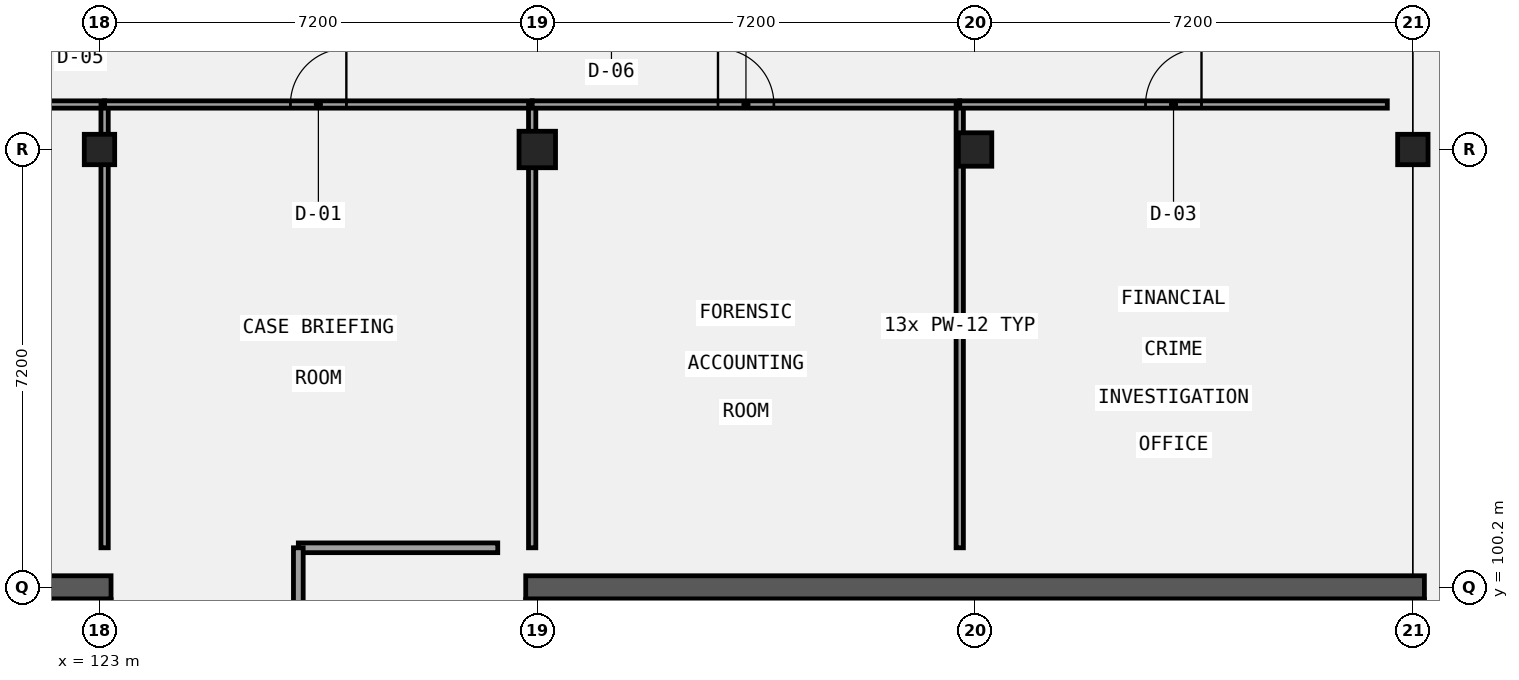
"""IFC4 building model, lengths in metres.
Left out: names, types, materials, properties, quantities, classifications, styles, units other than length and angle.
Written with IfcOpenShell. Run it as: python <this file> out.ifc"""

import sys

from ifc_helpers import new_model, si_unit, direction, frame, frame_2d, origin, origin_2d, place, context, subcontext, project, spatial, rectangle, extrude, element, fill, save


model = new_model("IFC4")
c1 = context("Model", 3, precision=1e-05, world=origin(), true_north=direction((0.0, 1.0)))
c2 = subcontext(c1, "Body", "Model", "MODEL_VIEW")
j1 = project(units=[si_unit("LENGTHUNIT", "METRE"), si_unit("PLANEANGLEUNIT", "RADIAN")], contexts=[c1])
p1 = place(None, origin())
s1 = spatial("IfcSite", under=j1, at=p1, CompositionType="ELEMENT")
p2 = place(p1, origin())
s2 = spatial("IfcBuilding", under=s1, at=p2, CompositionType="ELEMENT")
p3 = place(p2, frame((0.0, 0.0, 18.0)))
s3 = spatial("IfcBuildingStorey", under=s2, at=p3, CompositionType="ELEMENT", Elevation=18.0)
p4 = place(p3, frame((108.41, 100.2, 0.0), z_axis=(0.0, 0.0, 1.0), x_axis=(1.0, 0.0, 0.0)))
e1 = element("IfcWall", 1, at=p4, inside=s3, PredefinedType="SHEAR", context=c2, shape_type="SweptSolid", body=[
    extrude(rectangle(XDim=14.78, YDim=0.38, at=frame_2d((7.39, 0.0))), origin(), (0.0, 0.0, 1.0), 4.2),
])
p5 = place(p3, frame((123.0, 93.2, 0.0), z_axis=(0.0, 0.0, 1.0), x_axis=(0.0, 1.0, 0.0)))
e2 = element("IfcWall", 2, at=p5, inside=s3, PredefinedType="SHEAR", context=c2, shape_type="SweptSolid", body=[
    extrude(rectangle(XDim=6.8, YDim=0.38, at=frame_2d((3.4, 0.0))), origin(), (0.0, 0.0, 1.0), 4.2),
])
p6 = place(p3, frame((122.34, 96.82, 0.0), z_axis=(0.0, 0.0, 1.0), x_axis=(0.0, 1.0, 0.0)))
e3 = element("IfcWall", 3, at=p6, inside=s3, PredefinedType="SHEAR", context=c2, shape_type="SweptSolid", body=[
    extrude(rectangle(XDim=3.18, YDim=0.38, at=frame_2d((1.59, 0.0))), origin(), (0.0, 0.0, 1.0), 4.2),
])
p7 = place(p3, frame((130.01, 100.2, 0.0), z_axis=(0.0, 0.0, 1.0), x_axis=(1.0, 0.0, 0.0)))
e4 = element("IfcWall", 4, at=p7, inside=s3, PredefinedType="SHEAR", context=c2, shape_type="SweptSolid", body=[
    extrude(rectangle(XDim=14.78, YDim=0.38, at=frame_2d((7.39, 0.0))), origin(), (0.0, 0.0, 1.0), 4.2),
])
for number, where, z_axis, x_axis in (
    (5, (130.2, 93.2, 0.0), (0.0, 0.0, 1.0), (0.0, 1.0, 0.0)),
    (6, (144.6, 93.2, 0.0), (0.0, 0.0, 1.0), (0.0, 1.0, 0.0)),
):
    element("IfcWall", number, at=place(p3, frame(where, z_axis=z_axis, x_axis=x_axis)), inside=s3, PredefinedType="SHEAR", context=c2, shape_type="SweptSolid", body=[
        extrude(rectangle(XDim=6.8, YDim=0.38, at=frame_2d((3.4, 0.0))), origin(), (0.0, 0.0, 1.0), 4.2),
    ])
for number, where, z_axis, x_axis in (
    (7, (138.18, 96.82, 0.0), (0.0, 0.0, 1.0), (0.0, 1.0, 0.0)),
    (8, (140.1, 96.82, 0.0), (0.0, 0.0, 1.0), (0.0, 1.0, 0.0)),
    (9, (142.02, 96.82, 0.0), (0.0, 0.0, 1.0), (0.0, 1.0, 0.0)),
    (10, (143.94, 96.82, 0.0), (0.0, 0.0, 1.0), (0.0, 1.0, 0.0)),
):
    element("IfcWall", number, at=place(p3, frame(where, z_axis=z_axis, x_axis=x_axis)), inside=s3, PredefinedType="SHEAR", context=c2, shape_type="SweptSolid", body=[
        extrude(rectangle(XDim=3.18, YDim=0.38, at=frame_2d((1.59, 0.0))), origin(), (0.0, 0.0, 1.0), 4.2),
    ])
p8 = place(p3, frame((123.0, 107.4, 0.0), z_axis=(0.0, 0.0, 1.0), x_axis=(1.0, 0.0, 0.0)))
e11 = element("IfcColumn", 11, at=p8, inside=s3, PredefinedType="COLUMN", context=c2, shape_type="SweptSolid", body=[
    extrude(rectangle(XDim=0.5, YDim=0.5, at=origin_2d()), origin(), (0.0, 0.0, 1.0), 4.2),
])
p9 = place(p3, frame((130.2, 107.4, 0.0), z_axis=(0.0, 0.0, 1.0), x_axis=(1.0, 0.0, 0.0)))
e12 = element("IfcColumn", 12, at=p9, inside=s3, PredefinedType="COLUMN", context=c2, shape_type="SweptSolid", body=[
    extrude(rectangle(XDim=0.6, YDim=0.6, at=origin_2d()), origin(), (0.0, 0.0, 1.0), 4.2),
])
p10 = place(p3, frame((137.4, 107.4, 0.0), z_axis=(0.0, 0.0, 1.0), x_axis=(1.0, 0.0, 0.0)))
e13 = element("IfcColumn", 13, at=p10, inside=s3, PredefinedType="COLUMN", context=c2, shape_type="SweptSolid", body=[
    extrude(rectangle(XDim=0.55, YDim=0.55, at=origin_2d()), origin(), (0.0, 0.0, 1.0), 4.2),
])
p11 = place(p3, frame((144.6, 107.4, 0.0), z_axis=(0.0, 0.0, 1.0), x_axis=(1.0, 0.0, 0.0)))
e14 = element("IfcColumn", 14, at=p11, inside=s3, PredefinedType="COLUMN", context=c2, shape_type="SweptSolid", body=[
    extrude(rectangle(XDim=0.5, YDim=0.5, at=origin_2d()), origin(), (0.0, 0.0, 1.0), 4.2),
])
p12 = place(p3, frame((116.052, 108.14, 0.0), z_axis=(0.0, 0.0, 1.0), x_axis=(1.0, 0.0, 0.0)))
e15 = element("IfcWall", 15, at=p12, inside=s3, PredefinedType="PARTITIONING", context=c2, shape_type="SweptSolid", body=[
    extrude(rectangle(XDim=7.032, YDim=0.12, at=frame_2d((3.516, 0.0))), origin(), (0.0, 0.0, 1.0), 3.94),
])
p13 = place(p12, frame((2.656, 0.0, 0.0)))
e16 = element("IfcOpeningElement", 16, at=p13, cuts=e15, PredefinedType="OPENING", context=c2, shape_type="SweptSolid", body=[
    extrude(rectangle(XDim=1.72, YDim=2.35, at=frame_2d((0.86, 1.175))), frame((0.0, 0.07, 0.0), z_axis=(0.0, -1.0, 0.0), x_axis=(1.0, 0.0, 0.0)), (0.0, 0.0, 1.0), 0.14),
])
p14 = place(p3, frame((123.084, 100.85, 0.0), z_axis=(0.0, 0.0, 1.0), x_axis=(0.0, 1.0, 0.0)))
e17 = element("IfcWall", 17, at=p14, inside=s3, PredefinedType="PARTITIONING", context=c2, shape_type="SweptSolid", body=[
    extrude(rectangle(XDim=7.29, YDim=0.12, at=frame_2d((3.645, 0.0))), origin(), (0.0, 0.0, 1.0), 3.14),
])
p15 = place(p3, frame((123.084, 108.14, 0.0), z_axis=(0.0, 0.0, 1.0), x_axis=(1.0, 0.0, 0.0)))
e18 = element("IfcWall", 18, at=p15, inside=s3, PredefinedType="PARTITIONING", context=c2, shape_type="SweptSolid", body=[
    extrude(rectangle(XDim=7.032, YDim=0.12, at=frame_2d((3.516, 0.0))), origin(), (0.0, 0.0, 1.0), 3.94),
])
p16 = place(p15, frame((3.056, 0.0, 0.0)))
e19 = element("IfcOpeningElement", 19, at=p16, cuts=e18, PredefinedType="OPENING", context=c2, shape_type="SweptSolid", body=[
    extrude(rectangle(XDim=0.92, YDim=2.1, at=frame_2d((0.46, 1.05))), frame((0.0, 0.07, 0.0), z_axis=(0.0, -1.0, 0.0), x_axis=(1.0, 0.0, 0.0)), (0.0, 0.0, 1.0), 0.14),
])
p17 = place(p3, frame((130.116, 100.85, 0.0), z_axis=(0.0, 0.0, 1.0), x_axis=(0.0, 1.0, 0.0)))
e20 = element("IfcWall", 20, at=p17, inside=s3, PredefinedType="PARTITIONING", context=c2, shape_type="SweptSolid", body=[
    extrude(rectangle(XDim=7.29, YDim=0.12, at=frame_2d((3.645, 0.0))), origin(), (0.0, 0.0, 1.0), 3.09),
])
p18 = place(p3, frame((130.116, 108.14, 0.0), z_axis=(0.0, 0.0, 1.0), x_axis=(1.0, 0.0, 0.0)))
e21 = element("IfcWall", 21, at=p18, inside=s3, PredefinedType="PARTITIONING", context=c2, shape_type="SweptSolid", body=[
    extrude(rectangle(XDim=7.032, YDim=0.12, at=frame_2d((3.516, 0.0))), origin(), (0.0, 0.0, 1.0), 3.94),
])
p19 = place(p18, frame((3.056, 0.0, 0.0)))
e22 = element("IfcOpeningElement", 22, at=p19, cuts=e21, PredefinedType="OPENING", context=c2, shape_type="SweptSolid", body=[
    extrude(rectangle(XDim=0.92, YDim=2.22, at=frame_2d((0.46, 1.11))), frame((0.0, 0.07, 0.0), z_axis=(0.0, -1.0, 0.0), x_axis=(1.0, 0.0, 0.0)), (0.0, 0.0, 1.0), 0.14),
])
p20 = place(p3, frame((137.148, 100.85, 0.0), z_axis=(0.0, 0.0, 1.0), x_axis=(0.0, 1.0, 0.0)))
e23 = element("IfcWall", 23, at=p20, inside=s3, PredefinedType="PARTITIONING", context=c2, shape_type="SweptSolid", body=[
    extrude(rectangle(XDim=7.29, YDim=0.12, at=frame_2d((3.645, 0.0))), origin(), (0.0, 0.0, 1.0), 3.04),
])
p21 = place(p3, frame((137.148, 108.14, 0.0), z_axis=(0.0, 0.0, 1.0), x_axis=(1.0, 0.0, 0.0)))
e24 = element("IfcWall", 24, at=p21, inside=s3, PredefinedType="PARTITIONING", context=c2, shape_type="SweptSolid", body=[
    extrude(rectangle(XDim=7.032, YDim=0.12, at=frame_2d((3.516, 0.0))), origin(), (0.0, 0.0, 1.0), 3.94),
])
p22 = place(p21, frame((3.056, 0.0, 0.0)))
e25 = element("IfcOpeningElement", 25, at=p22, cuts=e24, PredefinedType="OPENING", context=c2, shape_type="SweptSolid", body=[
    extrude(rectangle(XDim=0.92, YDim=2.35, at=frame_2d((0.46, 1.175))), frame((0.0, 0.07, 0.0), z_axis=(0.0, -1.0, 0.0), x_axis=(1.0, 0.0, 0.0)), (0.0, 0.0, 1.0), 0.14),
])
p23 = place(p3, frame((126.27, 100.85, 0.0), z_axis=(0.0, 0.0, 1.0), x_axis=(1.0, 0.0, 0.0)))
e26 = element("IfcWall", 26, at=p23, inside=s3, PredefinedType="PARTITIONING", context=c2, shape_type="SweptSolid", body=[
    extrude(rectangle(XDim=3.28, YDim=0.16, at=frame_2d((1.64, 0.0))), origin(), (0.0, 0.0, 1.0), 3.94),
])
p24 = place(p3, frame((126.27, 90.0, 0.0), z_axis=(0.0, 0.0, 1.0), x_axis=(0.0, 1.0, 0.0)))
e27 = element("IfcWall", 27, at=p24, inside=s3, PredefinedType="PARTITIONING", context=c2, shape_type="SweptSolid", body=[
    extrude(rectangle(XDim=10.85, YDim=0.16, at=frame_2d((5.425, 0.0))), origin(), (0.0, 0.0, 1.0), 3.94),
])
p25 = place(p24, frame((4.875, 0.0, 0.0)))
e28 = element("IfcOpeningElement", 28, at=p25, cuts=e27, PredefinedType="OPENING", context=c2, shape_type="SweptSolid", body=[
    extrude(rectangle(XDim=1.1, YDim=2.35, at=frame_2d((0.55, 1.175))), frame((0.0, 0.09, 0.0), z_axis=(0.0, -1.0, 0.0), x_axis=(1.0, 0.0, 0.0)), (0.0, 0.0, 1.0), 0.18),
])
p26 = place(p16, frame((0.92, 0.0, 0.0), z_axis=(0.0, 0.0, 1.0), x_axis=(-1.0, 0.0, 0.0)))
e29 = element("IfcDoor", 29, at=p26, inside=s3, OperationType="SINGLE_SWING_RIGHT", PredefinedType="DOOR", context=c2, shape_type="SweptSolid", body=[
    extrude(rectangle(XDim=0.92, YDim=2.1, at=frame_2d((0.46, 1.05))), frame((0.0, 0.025, 0.0), z_axis=(0.0, -1.0, 0.0), x_axis=(1.0, 0.0, 0.0)), (0.0, 0.0, 1.0), 0.05),
])
fill(e19, e29)
p27 = place(p19, frame((0.92, 0.0, 0.0), z_axis=(0.0, 0.0, 1.0), x_axis=(-1.0, 0.0, 0.0)))
e30 = element("IfcDoor", 30, at=p27, inside=s3, OperationType="SINGLE_SWING_LEFT", PredefinedType="DOOR", context=c2, shape_type="SweptSolid", body=[
    extrude(rectangle(XDim=0.92, YDim=2.22, at=frame_2d((0.46, 1.11))), frame((0.0, 0.025, 0.0), z_axis=(0.0, -1.0, 0.0), x_axis=(1.0, 0.0, 0.0)), (0.0, 0.0, 1.0), 0.05),
])
fill(e22, e30)
p28 = place(p22, frame((0.92, 0.0, 0.0), z_axis=(0.0, 0.0, 1.0), x_axis=(-1.0, 0.0, 0.0)))
e31 = element("IfcDoor", 31, at=p28, inside=s3, OperationType="SINGLE_SWING_RIGHT", PredefinedType="DOOR", context=c2, shape_type="SweptSolid", body=[
    extrude(rectangle(XDim=0.92, YDim=2.35, at=frame_2d((0.46, 1.175))), frame((0.0, 0.025, 0.0), z_axis=(0.0, -1.0, 0.0), x_axis=(1.0, 0.0, 0.0)), (0.0, 0.0, 1.0), 0.05),
])
fill(e25, e31)
save(model, sys.argv[1])
